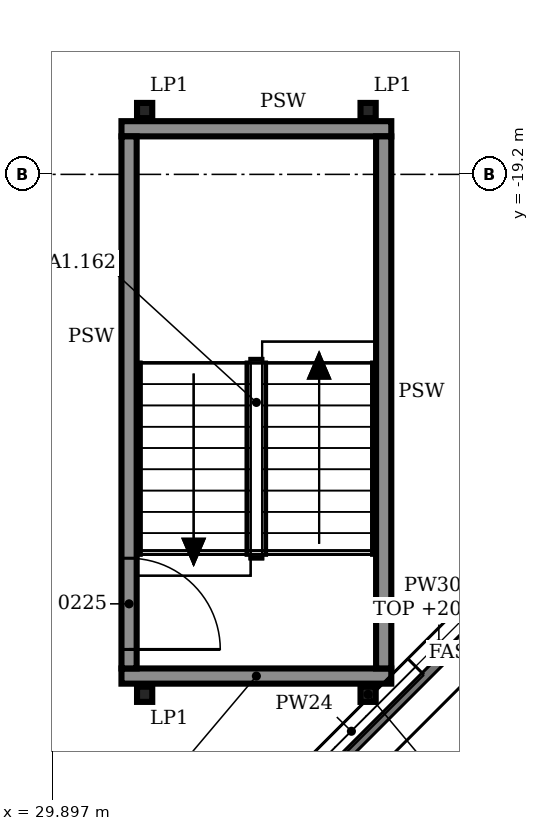
"""IFC4 building model, lengths in metres.
Left out: names, types, materials, properties, quantities, classifications, styles, units other than length and angle.
Written with IfcOpenShell. Run it as: python <this file> out.ifc"""

import sys

from ifc_helpers import new_model, si_unit, direction, frame, frame_2d, origin, origin_2d, place, context, subcontext, project, spatial, rectangle, i_section, extrude, element, fill, save


model = new_model("IFC4")
c1 = context("Model", 3, precision=1e-05, world=origin(), true_north=direction((0.0, 1.0)))
c2 = subcontext(c1, "Body", "Model", "MODEL_VIEW")
j1 = project(units=[si_unit("LENGTHUNIT", "METRE"), si_unit("PLANEANGLEUNIT", "RADIAN")], contexts=[c1])
p1 = place(None, origin())
s1 = spatial("IfcSite", under=j1, at=p1, CompositionType="ELEMENT")
p2 = place(p1, origin())
s2 = spatial("IfcBuilding", under=s1, at=p2, CompositionType="ELEMENT")
p3 = place(p2, frame((0.0, 0.0, 15.0)))
s3 = spatial("IfcBuildingStorey", under=s2, at=p3, CompositionType="ELEMENT", Elevation=15.0)
for number, where, z_axis, x_axis in (
    (1, (31.105, -18.36, 0.0), (0.0, 0.0, 1.0), (1.0, 0.0, 0.0)),
    (2, (34.045, -18.36, 0.0), (0.0, 0.0, 1.0), (1.0, 0.0, 0.0)),
):
    element("IfcColumn", number, at=place(p3, frame(where, z_axis=z_axis, x_axis=x_axis)), inside=s3, PredefinedType="COLUMN", context=c2, shape_type="SweptSolid", body=[
        extrude(i_section(OverallWidth=0.2, OverallDepth=0.2, WebThickness=0.009, FlangeThickness=0.015, FilletRadius=0.018, at=origin_2d()), origin(), (0.0, 0.0, 1.0), 6.0),
    ])
for number, where, z_axis, x_axis in (
    (3, (31.105, -26.04, 0.0), (0.0, 0.0, 1.0), (1.0, 0.0, 0.0)),
    (4, (34.045, -26.04, 0.0), (0.0, 0.0, 1.0), (1.0, 0.0, 0.0)),
):
    element("IfcColumn", number, at=place(p3, frame(where, z_axis=z_axis, x_axis=x_axis)), inside=s3, PredefinedType="COLUMN", context=c2, shape_type="SweptSolid", body=[
        extrude(i_section(OverallWidth=0.2, OverallDepth=0.2, WebThickness=0.009, FlangeThickness=0.015, FilletRadius=0.018, at=origin_2d()), origin(), (0.0, 0.0, 1.0), 2.8),
    ])
p4 = place(p3, frame((32.675, -27.677, 0.0), z_axis=(0.0, 0.0, 1.0), x_axis=(0.707088024292, 0.707125537583, 0.0)))
e5 = element("IfcWall", 5, at=p4, inside=s3, PredefinedType="SOLIDWALL", context=c2, shape_type="SweptSolid", body=[
    extrude(rectangle(XDim=6.508, YDim=0.3, at=frame_2d((3.254, 0.0))), origin(), (0.0, 0.0, 1.0), 5.2),
])
p5 = place(p4, frame((0.427, 0.0, 0.9)))
e6 = element("IfcOpeningElement", 6, at=p5, cuts=e5, PredefinedType="OPENING", context=c2, shape_type="SweptSolid", body=[
    extrude(rectangle(XDim=2.4, YDim=2.4, at=frame_2d((1.2, 1.2))), frame((0.0, 0.16, 0.0), z_axis=(0.0, -1.0, 0.0), x_axis=(1.0, 0.0, 0.0)), (0.0, 0.0, 1.0), 0.32),
])
p6 = place(p4, frame((3.681, 0.0, 0.9)))
e7 = element("IfcOpeningElement", 7, at=p6, cuts=e5, PredefinedType="OPENING", context=c2, shape_type="SweptSolid", body=[
    extrude(rectangle(XDim=2.4, YDim=2.4, at=frame_2d((1.2, 1.2))), frame((0.0, 0.16, 0.0), z_axis=(0.0, -1.0, 0.0), x_axis=(1.0, 0.0, 0.0)), (0.0, 0.0, 1.0), 0.32),
])
p7 = place(p3, frame((30.8, -25.8, 0.0), z_axis=(0.0, 0.0, 1.0), x_axis=(1.0, 0.0, 0.0)))
e8 = element("IfcWall", 8, at=p7, inside=s3, PredefinedType="SOLIDWALL", context=c2, shape_type="SweptSolid", body=[
    extrude(rectangle(XDim=3.55, YDim=0.2, at=frame_2d((1.775, 0.0))), origin(), (0.0, 0.0, 1.0), 5.8),
])
p8 = place(p3, frame((30.9, -25.7, 0.0), z_axis=(0.0, 0.0, 1.0), x_axis=(0.0, 1.0, 0.0)))
e9 = element("IfcWall", 9, at=p8, inside=s3, PredefinedType="SOLIDWALL", context=c2, shape_type="SweptSolid", body=[
    extrude(rectangle(XDim=7.0, YDim=0.2, at=frame_2d((3.5, 0.0))), origin(), (0.0, 0.0, 1.0), 5.8),
])
p9 = place(p8, frame((0.25, 0.0, 0.0)))
e10 = element("IfcOpeningElement", 10, at=p9, cuts=e9, PredefinedType="OPENING", context=c2, shape_type="SweptSolid", body=[
    extrude(rectangle(XDim=1.2, YDim=2.1, at=frame_2d((0.6, 1.05))), frame((0.0, 0.11, 0.0), z_axis=(0.0, -1.0, 0.0), x_axis=(1.0, 0.0, 0.0)), (0.0, 0.0, 1.0), 0.22),
])
p10 = place(p3, frame((34.25, -25.7, 0.0), z_axis=(0.0, 0.0, 1.0), x_axis=(0.0, 1.0, 0.0)))
e11 = element("IfcWall", 11, at=p10, inside=s3, PredefinedType="SOLIDWALL", context=c2, shape_type="SweptSolid", body=[
    extrude(rectangle(XDim=7.0, YDim=0.2, at=frame_2d((3.5, 0.0))), origin(), (0.0, 0.0, 1.0), 5.8),
])
p11 = place(p3, frame((30.8, -18.6, 0.0), z_axis=(0.0, 0.0, 1.0), x_axis=(1.0, 0.0, 0.0)))
e12 = element("IfcWall", 12, at=p11, inside=s3, PredefinedType="SOLIDWALL", context=c2, shape_type="SweptSolid", body=[
    extrude(rectangle(XDim=3.55, YDim=0.2, at=frame_2d((1.775, 0.0))), origin(), (0.0, 0.0, 1.0), 5.8),
])
p12 = place(p5, origin())
e13 = element("IfcWindow", 13, at=p12, inside=s3, PartitioningType="SINGLE_PANEL", PredefinedType="WINDOW", context=c2, shape_type="SweptSolid", body=[
    extrude(rectangle(XDim=2.4, YDim=2.4, at=frame_2d((1.2, 1.2))), frame((0.0, 0.03, 0.0), z_axis=(0.0, -1.0, 0.0), x_axis=(1.0, 0.0, 0.0)), (0.0, 0.0, 1.0), 0.06),
])
fill(e6, e13)
p13 = place(p9, frame((1.2, 0.0, 0.0), z_axis=(0.0, 0.0, 1.0), x_axis=(-1.0, 0.0, 0.0)))
e14 = element("IfcDoor", 14, at=p13, inside=s3, OperationType="SINGLE_SWING_RIGHT", PredefinedType="DOOR", context=c2, shape_type="SweptSolid", body=[
    extrude(rectangle(XDim=1.2, YDim=2.1, at=frame_2d((0.6, 1.05))), frame((0.0, 0.025, 0.0), z_axis=(0.0, -1.0, 0.0), x_axis=(1.0, 0.0, 0.0)), (0.0, 0.0, 1.0), 0.05),
])
fill(e10, e14)
save(model, sys.argv[1])
